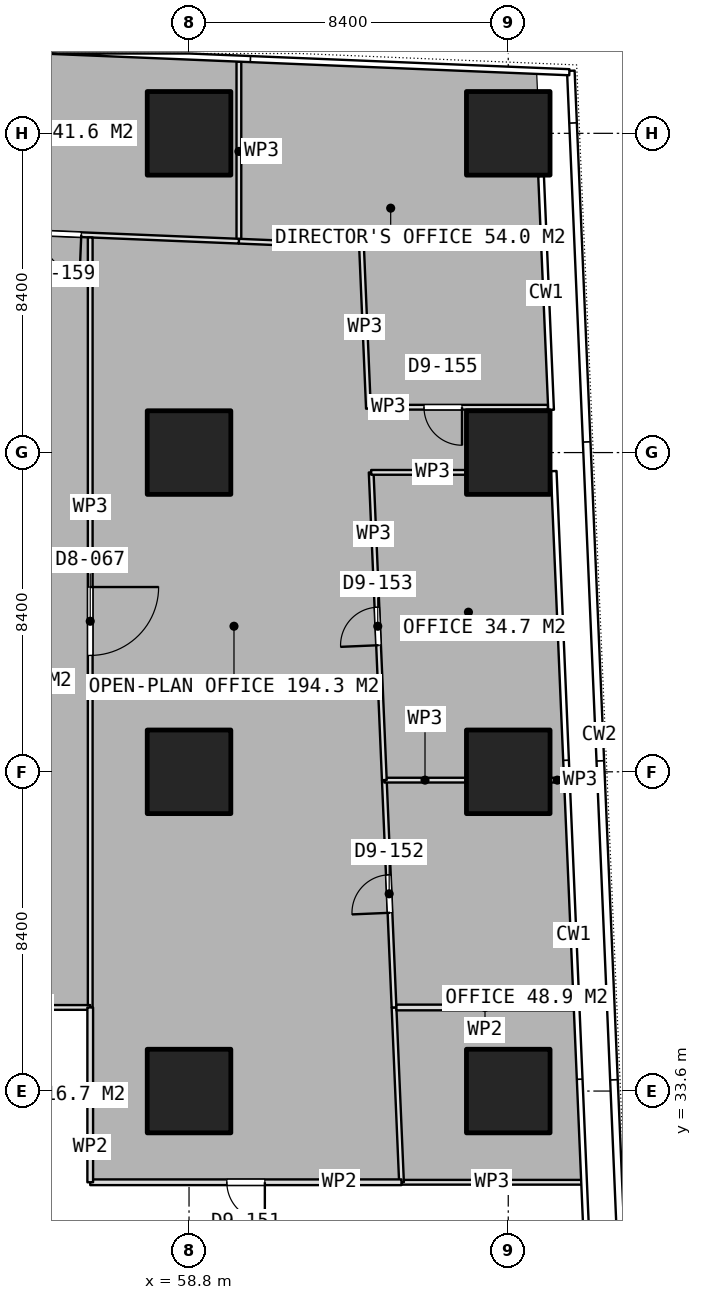
"""IFC4 building model, lengths in metres.
Left out: names, types, materials, properties, quantities, classifications, styles, units other than length and angle.
Written with IfcOpenShell. Run it as: python <this file> out.ifc"""

import sys

from ifc_helpers import new_model, si_unit, direction, frame, frame_2d, origin, origin_2d, place, context, subcontext, project, spatial, rectangle, extrude, element, fill, save


model = new_model("IFC4")
c1 = context("Model", 3, precision=1e-05, world=origin(), true_north=direction((0.0, 1.0)))
c2 = subcontext(c1, "Body", "Model", "MODEL_VIEW")
j1 = project(units=[si_unit("LENGTHUNIT", "METRE"), si_unit("PLANEANGLEUNIT", "RADIAN")], contexts=[c1])
p1 = place(None, origin())
s1 = spatial("IfcSite", under=j1, at=p1, CompositionType="ELEMENT")
p2 = place(p1, origin())
s2 = spatial("IfcBuilding", under=s1, at=p2, CompositionType="ELEMENT")
p3 = place(p2, frame((0.0, 0.0, 51.65)))
s3 = spatial("IfcBuildingStorey", under=s2, at=p3, CompositionType="ELEMENT", Elevation=51.65)
for number, where, z_axis, x_axis in (
    (1, (58.8, 33.6, 0.0), (0.0, 0.0, 1.0), (1.0, 0.0, 0.0)),
    (2, (58.8, 42.0, 0.0), (0.0, 0.0, 1.0), (1.0, 0.0, 0.0)),
    (3, (58.8, 50.4, 0.0), (0.0, 0.0, 1.0), (1.0, 0.0, 0.0)),
    (4, (58.8, 58.8, 0.0), (0.0, 0.0, 1.0), (1.0, 0.0, 0.0)),
    (5, (67.2, 33.6, 0.0), (0.0, 0.0, 1.0), (1.0, 0.0, 0.0)),
    (6, (67.2, 42.0, 0.0), (0.0, 0.0, 1.0), (1.0, 0.0, 0.0)),
    (7, (67.2, 50.4, 0.0), (0.0, 0.0, 1.0), (1.0, 0.0, 0.0)),
    (8, (67.2, 58.8, 0.0), (0.0, 0.0, 1.0), (1.0, 0.0, 0.0)),
):
    element("IfcColumn", number, at=place(p3, frame(where, z_axis=z_axis, x_axis=x_axis)), inside=s3, PredefinedType="COLUMN", context=c2, shape_type="SweptSolid", body=[
        extrude(rectangle(XDim=2.2, YDim=2.2, at=origin_2d()), origin(), (0.0, 0.0, 1.0), 3.75),
    ])
p4 = place(p3, frame((69.145, 31.2, 0.0), z_axis=(0.0, 0.0, 1.0), x_axis=(-1.0, 0.0, 0.0)))
e9 = element("IfcWall", 9, at=p4, inside=s3, PredefinedType="PARTITIONING", context=c2, shape_type="SweptSolid", body=[
    extrude(rectangle(XDim=4.754, YDim=0.125, at=frame_2d((2.377, 0.0))), origin(), (0.0, 0.0, 1.0), 3.5),
])
p5 = place(p3, frame((64.391, 31.2, 0.0), z_axis=(0.0, 0.0, 1.0), x_axis=(-0.042790618726, 0.999084062003, 0.0)))
e10 = element("IfcWall", 10, at=p5, inside=s3, PredefinedType="PARTITIONING", context=c2, shape_type="SweptSolid", body=[
    extrude(rectangle(XDim=4.604, YDim=0.125, at=frame_2d((2.302, 0.0))), origin(), (0.0, 0.0, 1.0), 3.5),
])
p6 = place(p3, frame((64.194, 35.8, 0.0), z_axis=(0.0, 0.0, 1.0), x_axis=(-0.042617787761, 0.999091449351, 0.0)))
e11 = element("IfcWall", 11, at=p6, inside=s3, PredefinedType="PARTITIONING", context=c2, shape_type="SweptSolid", body=[
    extrude(rectangle(XDim=5.986, YDim=0.125, at=frame_2d((2.993, 0.0))), origin(), (0.0, 0.0, 1.0), 3.5),
])
p7 = place(p6, frame((2.493, 0.0, 0.0)))
e12 = element("IfcOpeningElement", 12, at=p7, cuts=e11, PredefinedType="OPENING", context=c2, shape_type="SweptSolid", body=[
    extrude(rectangle(XDim=1.0, YDim=2.1, at=frame_2d((0.5, 1.05))), frame((0.0, 0.073, 0.0), z_axis=(0.0, -1.0, 0.0), x_axis=(1.0, 0.0, 0.0)), (0.0, 0.0, 1.0), 0.145),
])
p8 = place(p3, frame((63.939, 41.781, 0.0), z_axis=(0.0, 0.0, 1.0), x_axis=(1.0, 0.0, 0.0)))
e13 = element("IfcWall", 13, at=p8, inside=s3, PredefinedType="PARTITIONING", context=c2, shape_type="SweptSolid", body=[
    extrude(rectangle(XDim=2.141, YDim=0.125, at=frame_2d((1.071, 0.0))), origin(), (0.0, 0.0, 1.0), 3.5),
])
p9 = place(p3, frame((68.32, 41.781, 0.0), z_axis=(0.0, 0.0, 1.0), x_axis=(1.0, 0.0, 0.0)))
e14 = element("IfcWall", 14, at=p9, inside=s3, PredefinedType="PARTITIONING", context=c2, shape_type="SweptSolid", body=[
    extrude(rectangle(XDim=0.343, YDim=0.125, at=frame_2d((0.171, 0.0))), origin(), (0.0, 0.0, 1.0), 3.5),
])
p10 = place(p3, frame((63.939, 41.782, 0.0), z_axis=(0.0, 0.0, 1.0), x_axis=(-0.042686820675, 0.999088502256, 0.0)))
e15 = element("IfcWall", 15, at=p10, inside=s3, PredefinedType="PARTITIONING", context=c2, shape_type="SweptSolid", body=[
    extrude(rectangle(XDim=8.104, YDim=0.125, at=frame_2d((4.052, 0.0))), origin(), (0.0, 0.0, 1.0), 3.5),
])
p11 = place(p10, frame((3.552, 0.0, 0.0)))
e16 = element("IfcOpeningElement", 16, at=p11, cuts=e15, PredefinedType="OPENING", context=c2, shape_type="SweptSolid", body=[
    extrude(rectangle(XDim=1.0, YDim=2.1, at=frame_2d((0.5, 1.05))), frame((0.0, 0.073, 0.0), z_axis=(0.0, -1.0, 0.0), x_axis=(1.0, 0.0, 0.0)), (0.0, 0.0, 1.0), 0.145),
])
p12 = place(p3, frame((63.593, 49.879, 0.0), z_axis=(0.0, 0.0, 1.0), x_axis=(1.0, 0.0, 0.0)))
e17 = element("IfcWall", 17, at=p12, inside=s3, PredefinedType="PARTITIONING", context=c2, shape_type="SweptSolid", body=[
    extrude(rectangle(XDim=2.487, YDim=0.125, at=frame_2d((1.244, 0.0))), origin(), (0.0, 0.0, 1.0), 3.5),
])
p13 = place(p3, frame((60.112, 55.962, 0.0), z_axis=(0.0, 0.0, 1.0), x_axis=(0.0, 1.0, 0.0)))
e18 = element("IfcWall", 18, at=p13, inside=s3, PredefinedType="PARTITIONING", context=c2, shape_type="SweptSolid", body=[
    extrude(rectangle(XDim=4.724, YDim=0.125, at=frame_2d((2.362, 0.0))), origin(), (0.0, 0.0, 1.0), 3.5),
])
p14 = place(p3, frame((68.244, 51.593, 0.0), z_axis=(0.0, 0.0, 1.0), x_axis=(-1.0, 0.0, 0.0)))
e19 = element("IfcWall", 19, at=p14, inside=s3, PredefinedType="PARTITIONING", context=c2, shape_type="SweptSolid", body=[
    extrude(rectangle(XDim=4.662, YDim=0.125, at=frame_2d((2.331, 0.0))), origin(), (0.0, 0.0, 1.0), 3.5),
])
p15 = place(p14, frame((2.261, 0.0, 0.0)))
e20 = element("IfcOpeningElement", 20, at=p15, cuts=e19, PredefinedType="OPENING", context=c2, shape_type="SweptSolid", body=[
    extrude(rectangle(XDim=1.0, YDim=2.1, at=frame_2d((0.5, 1.05))), frame((0.0, 0.073, 0.0), z_axis=(0.0, -1.0, 0.0), x_axis=(1.0, 0.0, 0.0)), (0.0, 0.0, 1.0), 0.145),
])
p16 = place(p3, frame((63.521, 51.557, 0.0), z_axis=(0.0, 0.0, 1.0), x_axis=(-0.042535330456, 0.999094963286, 0.0)))
e21 = element("IfcWall", 21, at=p16, inside=s3, PredefinedType="PARTITIONING", context=c2, shape_type="SweptSolid", body=[
    extrude(rectangle(XDim=4.276, YDim=0.125, at=frame_2d((2.138, 0.0))), origin(), (0.0, 0.0, 1.0), 3.5),
])
p17 = place(p3, frame((63.339, 55.829, 0.0), z_axis=(0.0, 0.0, 1.0), x_axis=(-0.999154166221, 0.04112118826, 0.0)))
e22 = element("IfcWall", 22, at=p17, inside=s3, PredefinedType="PARTITIONING", context=c2, shape_type="SweptSolid", body=[
    extrude(rectangle(XDim=3.23, YDim=0.125, at=frame_2d((1.615, 0.0))), origin(), (0.0, 0.0, 1.0), 3.5),
])
p18 = place(p3, frame((60.111, 55.962, 0.0), z_axis=(0.0, 0.0, 1.0), x_axis=(-0.999152748928, 0.041155610913, 0.0)))
e23 = element("IfcWall", 23, at=p18, inside=s3, PredefinedType="PARTITIONING", context=c2, shape_type="SweptSolid", body=[
    extrude(rectangle(XDim=8.702, YDim=0.125, at=frame_2d((4.351, 0.0))), origin(), (0.0, 0.0, 1.0), 3.5),
])
p19 = place(p18, frame((4.15, 0.0, 0.0)))
e24 = element("IfcOpeningElement", 24, at=p19, cuts=e23, PredefinedType="OPENING", context=c2, shape_type="SweptSolid", body=[
    extrude(rectangle(XDim=1.0, YDim=2.1, at=frame_2d((0.5, 1.05))), frame((0.0, 0.073, 0.0), z_axis=(0.0, -1.0, 0.0), x_axis=(1.0, 0.0, 0.0)), (0.0, 0.0, 1.0), 0.145),
])
p20 = place(p3, frame((56.2, 56.06, 0.0), z_axis=(0.0, 0.0, 1.0), x_axis=(0.0, -1.0, 0.0)))
e25 = element("IfcWall", 25, at=p20, inside=s3, PredefinedType="PARTITIONING", context=c2, shape_type="SweptSolid", body=[
    extrude(rectangle(XDim=20.26, YDim=0.125, at=frame_2d((10.13, 0.0))), origin(), (0.0, 0.0, 1.0), 3.5),
])
p21 = place(p20, frame((9.198, 0.0, 0.0)))
e26 = element("IfcOpeningElement", 26, at=p21, cuts=e25, PredefinedType="OPENING", context=c2, shape_type="SweptSolid", body=[
    extrude(rectangle(XDim=1.8, YDim=2.1, at=frame_2d((0.9, 1.05))), frame((0.0, 0.073, 0.0), z_axis=(0.0, -1.0, 0.0), x_axis=(1.0, 0.0, 0.0)), (0.0, 0.0, 1.0), 0.145),
])
p22 = place(p3, frame((56.2, 35.8, 0.0), z_axis=(0.0, 0.0, 1.0), x_axis=(-1.0, 0.0, 0.0)))
e27 = element("IfcWall", 27, at=p22, inside=s3, PredefinedType="PARTITIONING", context=c2, shape_type="SweptSolid", body=[
    extrude(rectangle(XDim=3.0, YDim=0.125, at=frame_2d((1.5, 0.0))), origin(), (0.0, 0.0, 1.0), 3.5),
])
p23 = place(p3, frame((64.257, 35.799, 0.0), z_axis=(0.0, 0.0, 1.0), x_axis=(1.0, 0.0, 0.0)))
e28 = element("IfcWall", 28, at=p23, inside=s3, PredefinedType="PARTITIONING", context=c2, shape_type="SweptSolid", body=[
    extrude(rectangle(XDim=4.662, YDim=0.15, at=frame_2d((2.331, 0.0))), origin(), (0.0, 0.0, 1.0), 3.5),
])
p24 = place(p3, frame((64.391, 31.2, 0.0), z_axis=(0.0, 0.0, 1.0), x_axis=(-1.0, 0.0, 0.0)))
e29 = element("IfcWall", 29, at=p24, inside=s3, PredefinedType="PARTITIONING", context=c2, shape_type="SweptSolid", body=[
    extrude(rectangle(XDim=8.191, YDim=0.15, at=frame_2d((4.096, 0.0))), origin(), (0.0, 0.0, 1.0), 3.5),
])
p25 = place(p24, frame((3.596, 0.0, 0.0)))
e30 = element("IfcOpeningElement", 30, at=p25, cuts=e29, PredefinedType="OPENING", context=c2, shape_type="SweptSolid", body=[
    extrude(rectangle(XDim=1.0, YDim=2.1, at=frame_2d((0.5, 1.05))), frame((0.0, 0.085, 0.0), z_axis=(0.0, -1.0, 0.0), x_axis=(1.0, 0.0, 0.0)), (0.0, 0.0, 1.0), 0.17),
])
p26 = place(p3, frame((56.2, 31.2, 0.0), z_axis=(0.0, 0.0, 1.0), x_axis=(0.0, 1.0, 0.0)))
e31 = element("IfcWall", 31, at=p26, inside=s3, PredefinedType="PARTITIONING", context=c2, shape_type="SweptSolid", body=[
    extrude(rectangle(XDim=4.6, YDim=0.15, at=frame_2d((2.3, 0.0))), origin(), (0.0, 0.0, 1.0), 3.5),
])
p27 = place(p7, origin())
e32 = element("IfcDoor", 32, at=p27, inside=s3, OperationType="SINGLE_SWING_LEFT", PredefinedType="DOOR", context=c2, shape_type="SweptSolid", body=[
    extrude(rectangle(XDim=1.0, YDim=2.1, at=frame_2d((0.5, 1.05))), frame((0.0, 0.025, 0.0), z_axis=(0.0, -1.0, 0.0), x_axis=(1.0, 0.0, 0.0)), (0.0, 0.0, 1.0), 0.05),
])
fill(e12, e32)
p28 = place(p11, origin())
e33 = element("IfcDoor", 33, at=p28, inside=s3, OperationType="SINGLE_SWING_LEFT", PredefinedType="DOOR", context=c2, shape_type="SweptSolid", body=[
    extrude(rectangle(XDim=1.0, YDim=2.1, at=frame_2d((0.5, 1.05))), frame((0.0, 0.025, 0.0), z_axis=(0.0, -1.0, 0.0), x_axis=(1.0, 0.0, 0.0)), (0.0, 0.0, 1.0), 0.05),
])
fill(e16, e33)
p29 = place(p15, origin())
e34 = element("IfcDoor", 34, at=p29, inside=s3, OperationType="SINGLE_SWING_LEFT", PredefinedType="DOOR", context=c2, shape_type="SweptSolid", body=[
    extrude(rectangle(XDim=1.0, YDim=2.1, at=frame_2d((0.5, 1.05))), frame((0.0, 0.025, 0.0), z_axis=(0.0, -1.0, 0.0), x_axis=(1.0, 0.0, 0.0)), (0.0, 0.0, 1.0), 0.05),
])
fill(e20, e34)
p30 = place(p21, origin())
e35 = element("IfcDoor", 35, at=p30, inside=s3, OperationType="DOUBLE_DOOR_SINGLE_SWING", PredefinedType="DOOR", context=c2, shape_type="SweptSolid", body=[
    extrude(rectangle(XDim=1.8, YDim=2.1, at=frame_2d((0.9, 1.05))), frame((0.0, 0.025, 0.0), z_axis=(0.0, -1.0, 0.0), x_axis=(1.0, 0.0, 0.0)), (0.0, 0.0, 1.0), 0.05),
])
fill(e26, e35)
p31 = place(p25, origin())
e36 = element("IfcDoor", 36, at=p31, inside=s3, OperationType="SINGLE_SWING_LEFT", PredefinedType="DOOR", context=c2, shape_type="SweptSolid", body=[
    extrude(rectangle(XDim=1.0, YDim=2.1, at=frame_2d((0.5, 1.05))), frame((0.0, 0.025, 0.0), z_axis=(0.0, -1.0, 0.0), x_axis=(1.0, 0.0, 0.0)), (0.0, 0.0, 1.0), 0.05),
])
fill(e30, e36)
p32 = place(p19, origin())
e37 = element("IfcDoor", 37, at=p32, inside=s3, OperationType="SINGLE_SWING_LEFT", PredefinedType="DOOR", context=c2, shape_type="SweptSolid", body=[
    extrude(rectangle(XDim=1.0, YDim=2.1, at=frame_2d((0.5, 1.05))), frame((0.0, 0.025, 0.0), z_axis=(0.0, -1.0, 0.0), x_axis=(1.0, 0.0, 0.0)), (0.0, 0.0, 1.0), 0.05),
])
fill(e24, e37)
save(model, sys.argv[1])
